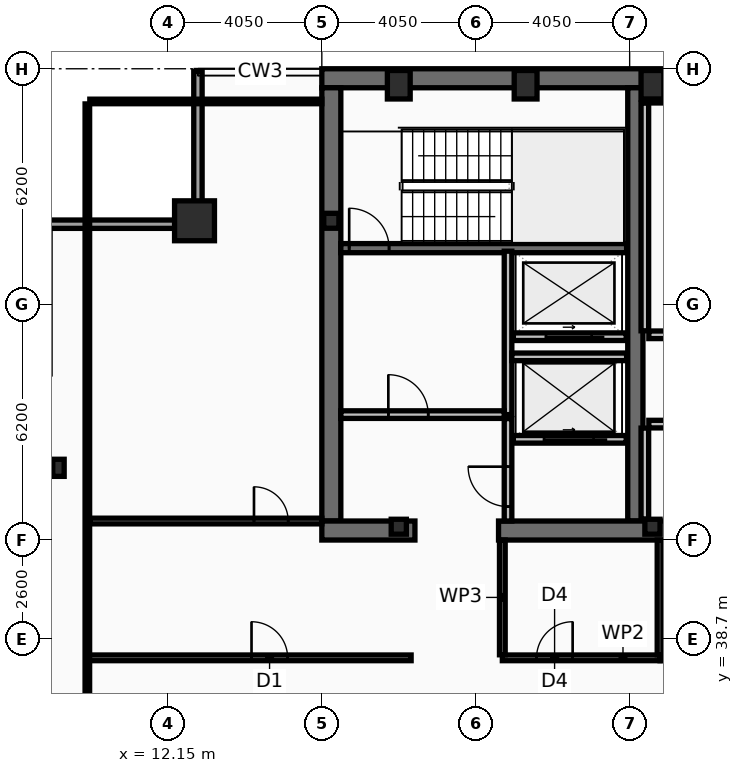
"""IFC4 building model, lengths in metres.
Left out: names, types, materials, properties, quantities, classifications, styles, units other than length and angle.
Written with IfcOpenShell. Run it as: python <this file> out.ifc"""

import sys

from ifc_helpers import new_model, si_unit, direction, frame, frame_2d, origin, origin_2d, place, context, subcontext, project, spatial, rectangle, hollow_rectangle, i_section, extrude, element, fill, save


model = new_model("IFC4")
c1 = context("Model", 3, precision=1e-05, world=origin(), true_north=direction((0.0, 1.0)))
c2 = subcontext(c1, "Body", "Model", "MODEL_VIEW")
j1 = project(units=[si_unit("LENGTHUNIT", "METRE"), si_unit("PLANEANGLEUNIT", "RADIAN")], contexts=[c1])
p1 = place(None, origin())
s1 = spatial("IfcSite", under=j1, at=p1, CompositionType="ELEMENT")
p2 = place(p1, origin())
s2 = spatial("IfcBuilding", under=s1, at=p2, CompositionType="ELEMENT")
p3 = place(p2, frame((0.0, 0.0, 269.8)))
s3 = spatial("IfcBuildingStorey", under=s2, at=p3, CompositionType="ELEMENT", Elevation=269.8)
p4 = place(p3, frame((16.2, 53.45, 0.0), z_axis=(0.0, 0.0, 1.0), x_axis=(1.0, 0.0, 0.0)))
e1 = element("IfcWall", 1, at=p4, inside=s3, PredefinedType="SHEAR", context=c2, shape_type="SweptSolid", body=[
    extrude(rectangle(XDim=40.5, YDim=0.5, at=frame_2d((20.25, 0.0))), origin(), (0.0, 0.0, 1.0), 3.44),
])
p5 = place(p3, frame((16.45, 41.8, 0.0), z_axis=(0.0, 0.0, 1.0), x_axis=(0.0, 1.0, 0.0)))
e2 = element("IfcWall", 2, at=p5, inside=s3, PredefinedType="SHEAR", context=c2, shape_type="SweptSolid", body=[
    extrude(rectangle(XDim=11.4, YDim=0.5, at=frame_2d((5.7, 0.0))), origin(), (0.0, 0.0, 1.0), 3.44),
])
p6 = place(p3, frame((24.45, 41.8, 0.0), z_axis=(0.0, 0.0, 1.0), x_axis=(0.0, 1.0, 0.0)))
e3 = element("IfcWall", 3, at=p6, inside=s3, PredefinedType="SHEAR", context=c2, shape_type="SweptSolid", body=[
    extrude(rectangle(XDim=11.4, YDim=0.4, at=frame_2d((5.7, 0.0))), origin(), (0.0, 0.0, 1.0), 3.44),
])
p7 = place(p3, frame((18.65, 41.55, 0.0), z_axis=(0.0, 0.0, 1.0), x_axis=(-1.0, 0.0, 0.0)))
e4 = element("IfcWall", 4, at=p7, inside=s3, PredefinedType="SHEAR", context=c2, shape_type="SweptSolid", body=[
    extrude(rectangle(XDim=2.45, YDim=0.5, at=frame_2d((1.225, 0.0))), origin(), (0.0, 0.0, 1.0), 3.44),
])
p8 = place(p3, frame((32.3, 41.55, 0.0), z_axis=(0.0, 0.0, 1.0), x_axis=(-1.0, 0.0, 0.0)))
e5 = element("IfcWall", 5, at=p8, inside=s3, PredefinedType="SHEAR", context=c2, shape_type="SweptSolid", body=[
    extrude(rectangle(XDim=11.45, YDim=0.5, at=frame_2d((5.725, 0.0))), origin(), (0.0, 0.0, 1.0), 3.44),
])
p9 = place(p3, frame((16.7, 48.98, 0.0), z_axis=(0.0, 0.0, 1.0), x_axis=(1.0, 0.0, 0.0)))
e6 = element("IfcWall", 6, at=p9, inside=s3, PredefinedType="SHEAR", context=c2, shape_type="SweptSolid", body=[
    extrude(rectangle(XDim=7.52, YDim=0.24, at=frame_2d((3.76, 0.0))), origin(), (0.0, 0.0, 1.0), 3.44),
])
p10 = place(p9, frame((0.22, 0.0, 0.0)))
e7 = element("IfcOpeningElement", 7, at=p10, cuts=e6, PredefinedType="OPENING", context=c2, shape_type="SweptSolid", body=[
    extrude(rectangle(XDim=1.05, YDim=2.15, at=frame_2d((0.525, 1.075))), frame((0.0, 0.13, 0.0), z_axis=(0.0, -1.0, 0.0), x_axis=(1.0, 0.0, 0.0)), (0.0, 0.0, 1.0), 0.26),
])
p11 = place(p3, frame((12.85, 49.7, 0.0), z_axis=(0.0, 0.0, 1.0), x_axis=(1.0, 0.0, 0.0)))
e8 = element("IfcColumn", 8, at=p11, inside=s3, PredefinedType="COLUMN", context=c2, shape_type="SweptSolid", body=[
    extrude(hollow_rectangle(XDim=1.05, YDim=1.05, WallThickness=0.055, at=origin_2d()), origin(), (0.0, 0.0, 1.0), 3.6),
])
for number, where, z_axis, x_axis in (
    (9, (18.225, 53.28, 0.0), (0.0, 0.0, 1.0), (1.0, 0.0, 0.0)),
    (10, (21.562, 53.28, 0.0), (0.0, 0.0, 1.0), (1.0, 0.0, 0.0)),
    (11, (24.9, 53.28, 0.0), (0.0, 0.0, 1.0), (1.0, 0.0, 0.0)),
):
    element("IfcColumn", number, at=place(p3, frame(where, z_axis=z_axis, x_axis=x_axis)), inside=s3, PredefinedType="COLUMN", context=c2, shape_type="SweptSolid", body=[
        extrude(hollow_rectangle(XDim=0.6, YDim=0.75, WallThickness=0.045, at=origin_2d()), origin(), (0.0, 0.0, 1.0), 3.6),
    ])
p12 = place(p3, frame((9.27, 43.2, 0.0), z_axis=(0.0, 0.0, 1.0), x_axis=(1.0, 0.0, 0.0)))
e12 = element("IfcColumn", 12, at=p12, inside=s3, PredefinedType="COLUMN", context=c2, shape_type="SweptSolid", body=[
    extrude(i_section(OverallWidth=0.3, OverallDepth=0.45, WebThickness=0.014, FlangeThickness=0.026, at=origin_2d()), origin(), (0.0, 0.0, 1.0), 3.6),
])
for number, where, z_axis, x_axis in (
    (13, (16.45, 49.7, 0.0), (0.0, 0.0, 1.0), (1.0, 0.0, 0.0)),
    (14, (18.225, 41.65, 0.0), (0.0, 0.0, 1.0), (1.0, 0.0, 0.0)),
    (15, (24.9, 41.65, 0.0), (0.0, 0.0, 1.0), (1.0, 0.0, 0.0)),
):
    element("IfcColumn", number, at=place(p3, frame(where, z_axis=z_axis, x_axis=x_axis)), inside=s3, PredefinedType="COLUMN", context=c2, shape_type="SweptSolid", body=[
        extrude(i_section(OverallWidth=0.399, OverallDepth=0.393, WebThickness=0.023, FlangeThickness=0.037, at=origin_2d()), origin(), (0.0, 0.0, 1.0), 3.6),
    ])
p13 = place(p3, frame((8.83, 49.61, 0.0), z_axis=(0.0, 0.0, 1.0), x_axis=(1.0, 0.0, 0.0)))
e16 = element("IfcWall", 16, at=p13, inside=s3, PredefinedType="SOLIDWALL", context=c2, shape_type="SweptSolid", body=[
    extrude(rectangle(XDim=4.22, YDim=0.22, at=frame_2d((2.11, 0.0))), origin(), (0.0, 0.0, 1.0), 2.88),
])
p14 = place(p3, frame((12.94, 49.72, 0.0), z_axis=(0.0, 0.0, 1.0), x_axis=(0.0, 1.0, 0.0)))
e17 = element("IfcWall", 17, at=p14, inside=s3, PredefinedType="SOLIDWALL", context=c2, shape_type="SweptSolid", body=[
    extrude(rectangle(XDim=3.91, YDim=0.22, at=frame_2d((1.955, 0.0))), origin(), (0.0, 0.0, 1.0), 2.88),
])
p15 = place(p3, frame((24.21, 43.95, 0.0), z_axis=(0.0, 0.0, 1.0), x_axis=(-1.0, 0.0, 0.0)))
e18 = element("IfcWall", 18, at=p15, inside=s3, PredefinedType="PARTITIONING", context=c2, shape_type="SweptSolid", body=[
    extrude(rectangle(XDim=2.97, YDim=0.2, at=frame_2d((1.485, 0.0))), origin(), (0.0, 0.0, 1.0), 3.44),
])
p16 = place(p15, frame((0.86, 0.0, 0.0)))
e19 = element("IfcOpeningElement", 19, at=p16, cuts=e18, PredefinedType="OPENING", context=c2, shape_type="SweptSolid", body=[
    extrude(rectangle(XDim=1.3, YDim=2.18, at=frame_2d((0.65, 1.09))), frame((0.0, 0.11, 0.0), z_axis=(0.0, -1.0, 0.0), x_axis=(1.0, 0.0, 0.0)), (0.0, 0.0, 1.0), 0.22),
])
p17 = place(p3, frame((24.21, 46.65, 0.0), z_axis=(0.0, 0.0, 1.0), x_axis=(-1.0, 0.0, 0.0)))
e20 = element("IfcWall", 20, at=p17, inside=s3, PredefinedType="PARTITIONING", context=c2, shape_type="SweptSolid", body=[
    extrude(rectangle(XDim=2.97, YDim=0.2, at=frame_2d((1.485, 0.0))), origin(), (0.0, 0.0, 1.0), 3.44),
])
p18 = place(p17, frame((0.91, 0.0, 0.0)))
e21 = element("IfcOpeningElement", 21, at=p18, cuts=e20, PredefinedType="OPENING", context=c2, shape_type="SweptSolid", body=[
    extrude(rectangle(XDim=1.2, YDim=2.18, at=frame_2d((0.6, 1.09))), frame((0.0, 0.11, 0.0), z_axis=(0.0, -1.0, 0.0), x_axis=(1.0, 0.0, 0.0)), (0.0, 0.0, 1.0), 0.22),
])
p19 = place(p3, frame((21.1, 44.6, 0.0), z_axis=(0.0, 0.0, 1.0), x_axis=(0.0, 1.0, 0.0)))
e22 = element("IfcWall", 22, at=p19, inside=s3, PredefinedType="PARTITIONING", context=c2, shape_type="SweptSolid", body=[
    extrude(rectangle(XDim=4.3, YDim=0.2, at=frame_2d((2.15, 0.0))), origin(), (0.0, 0.0, 1.0), 3.44),
])
p20 = place(p3, frame((16.7, 44.6, 0.0), z_axis=(0.0, 0.0, 1.0), x_axis=(1.0, 0.0, 0.0)))
e23 = element("IfcWall", 23, at=p20, inside=s3, PredefinedType="PARTITIONING", context=c2, shape_type="SweptSolid", body=[
    extrude(rectangle(XDim=4.3, YDim=0.2, at=frame_2d((2.15, 0.0))), origin(), (0.0, 0.0, 1.0), 3.44),
])
p21 = place(p20, frame((1.25, 0.0, 0.0)))
e24 = element("IfcOpeningElement", 24, at=p21, cuts=e23, PredefinedType="OPENING", context=c2, shape_type="SweptSolid", body=[
    extrude(rectangle(XDim=1.05, YDim=2.15, at=frame_2d((0.525, 1.075))), frame((0.0, 0.11, 0.0), z_axis=(0.0, -1.0, 0.0), x_axis=(1.0, 0.0, 0.0)), (0.0, 0.0, 1.0), 0.22),
])
p22 = place(p3, frame((21.2, 46.12, 0.0), z_axis=(0.0, 0.0, 1.0), x_axis=(1.0, 0.0, 0.0)))
e25 = element("IfcWall", 25, at=p22, inside=s3, PredefinedType="PARTITIONING", context=c2, shape_type="SweptSolid", body=[
    extrude(rectangle(XDim=3.02, YDim=0.2, at=frame_2d((1.51, 0.0))), origin(), (0.0, 0.0, 1.0), 3.44),
])
p23 = place(p3, frame((21.1, 41.8, 0.0), z_axis=(0.0, 0.0, 1.0), x_axis=(0.0, 1.0, 0.0)))
e26 = element("IfcWall", 26, at=p23, inside=s3, PredefinedType="PARTITIONING", context=c2, shape_type="SweptSolid", body=[
    extrude(rectangle(XDim=2.695, YDim=0.2, at=frame_2d((1.348, 0.0))), origin(), (0.0, 0.0, 1.0), 3.44),
])
p24 = place(p23, frame((0.38, 0.0, 0.0)))
e27 = element("IfcOpeningElement", 27, at=p24, cuts=e26, PredefinedType="OPENING", context=c2, shape_type="SweptSolid", body=[
    extrude(rectangle(XDim=1.05, YDim=2.15, at=frame_2d((0.525, 1.075))), frame((0.0, 0.11, 0.0), z_axis=(0.0, -1.0, 0.0), x_axis=(1.0, 0.0, 0.0)), (0.0, 0.0, 1.0), 0.22),
])
p25 = place(p3, frame((24.7, 46.805, 0.0), z_axis=(0.0, 0.0, 1.0), x_axis=(0.0, 1.0, 0.0)))
e28 = element("IfcWall", 28, at=p25, inside=s3, PredefinedType="PARTITIONING", context=c2, shape_type="SweptSolid", body=[
    extrude(rectangle(XDim=5.99, YDim=0.2, at=frame_2d((2.995, 0.0))), origin(), (0.0, 0.0, 1.0), 3.44),
])
p26 = place(p3, frame((24.805, 52.86, 0.0), z_axis=(0.0, 0.0, 1.0), x_axis=(1.0, 0.0, 0.0)))
e29 = element("IfcWall", 29, at=p26, inside=s3, PredefinedType="PARTITIONING", context=c2, shape_type="SweptSolid", body=[
    extrude(rectangle(XDim=7.51, YDim=0.12, at=frame_2d((3.755, 0.0))), origin(), (0.0, 0.0, 1.0), 3.44),
])
p27 = place(p3, frame((24.805, 46.7, 0.0), z_axis=(0.0, 0.0, 1.0), x_axis=(1.0, 0.0, 0.0)))
e30 = element("IfcWall", 30, at=p27, inside=s3, PredefinedType="PARTITIONING", context=c2, shape_type="SweptSolid", body=[
    extrude(rectangle(XDim=7.51, YDim=0.2, at=frame_2d((3.755, 0.0))), origin(), (0.0, 0.0, 1.0), 3.44),
])
p28 = place(p27, frame((2.4, 0.0, 0.0)))
e31 = element("IfcOpeningElement", 31, at=p28, cuts=e30, PredefinedType="OPENING", context=c2, shape_type="SweptSolid", body=[
    extrude(rectangle(XDim=0.95, YDim=2.1, at=frame_2d((0.475, 1.05))), frame((0.0, 0.11, 0.0), z_axis=(0.0, -1.0, 0.0), x_axis=(1.0, 0.0, 0.0)), (0.0, 0.0, 1.0), 0.22),
])
p29 = place(p3, frame((24.7, 41.85, 0.0), z_axis=(0.0, 0.0, 1.0), x_axis=(0.0, 1.0, 0.0)))
e32 = element("IfcWall", 32, at=p29, inside=s3, PredefinedType="PARTITIONING", context=c2, shape_type="SweptSolid", body=[
    extrude(rectangle(XDim=2.395, YDim=0.2, at=frame_2d((1.198, 0.0))), origin(), (0.0, 0.0, 1.0), 3.44),
])
p30 = place(p3, frame((24.805, 44.35, 0.0), z_axis=(0.0, 0.0, 1.0), x_axis=(1.0, 0.0, 0.0)))
e33 = element("IfcWall", 33, at=p30, inside=s3, PredefinedType="PARTITIONING", context=c2, shape_type="SweptSolid", body=[
    extrude(rectangle(XDim=7.34, YDim=0.2, at=frame_2d((3.67, 0.0))), origin(), (0.0, 0.0, 1.0), 3.44),
])
p31 = place(p30, frame((2.4, 0.0, 0.0)))
e34 = element("IfcOpeningElement", 34, at=p31, cuts=e33, PredefinedType="OPENING", context=c2, shape_type="SweptSolid", body=[
    extrude(rectangle(XDim=0.95, YDim=2.1, at=frame_2d((0.475, 1.05))), frame((0.0, 0.11, 0.0), z_axis=(0.0, -1.0, 0.0), x_axis=(1.0, 0.0, 0.0)), (0.0, 0.0, 1.0), 0.22),
])
p32 = place(p3, frame((20.95, 38.2, 0.0), z_axis=(0.0, 0.0, 1.0), x_axis=(1.0, 0.0, 0.0)))
e35 = element("IfcWall", 35, at=p32, inside=s3, PredefinedType="PARTITIONING", context=c2, shape_type="SweptSolid", body=[
    extrude(rectangle(XDim=4.15, YDim=0.15, at=frame_2d((2.075, 0.0))), origin(), (0.0, 0.0, 1.0), 2.78),
])
p33 = place(p32, frame((0.9, 0.0, 0.0)))
e36 = element("IfcOpeningElement", 36, at=p33, cuts=e35, PredefinedType="OPENING", context=c2, shape_type="SweptSolid", body=[
    extrude(rectangle(XDim=0.95, YDim=2.05, at=frame_2d((0.475, 1.025))), frame((0.0, 0.085, 0.0), z_axis=(0.0, -1.0, 0.0), x_axis=(1.0, 0.0, 0.0)), (0.0, 0.0, 1.0), 0.17),
])
p34 = place(p3, frame((25.1, 38.2, 0.0), z_axis=(0.0, 0.0, 1.0), x_axis=(1.0, 0.0, 0.0)))
e37 = element("IfcWall", 37, at=p34, inside=s3, PredefinedType="PARTITIONING", context=c2, shape_type="SweptSolid", body=[
    extrude(rectangle(XDim=3.3, YDim=0.15, at=frame_2d((1.65, 0.0))), origin(), (0.0, 0.0, 1.0), 2.78),
])
p35 = place(p34, frame((0.9, 0.0, 0.0)))
e38 = element("IfcOpeningElement", 38, at=p35, cuts=e37, PredefinedType="OPENING", context=c2, shape_type="SweptSolid", body=[
    extrude(rectangle(XDim=0.95, YDim=2.05, at=frame_2d((0.475, 1.025))), frame((0.0, 0.085, 0.0), z_axis=(0.0, -1.0, 0.0), x_axis=(1.0, 0.0, 0.0)), (0.0, 0.0, 1.0), 0.17),
])
p36 = place(p3, frame((20.95, 38.28, 0.0), z_axis=(0.0, 0.0, 1.0), x_axis=(0.0, 1.0, 0.0)))
e39 = element("IfcWall", 39, at=p36, inside=s3, PredefinedType="PARTITIONING", context=c2, shape_type="SweptSolid", body=[
    extrude(rectangle(XDim=3.02, YDim=0.15, at=frame_2d((1.51, 0.0))), origin(), (0.0, 0.0, 1.0), 3.44),
])
p37 = place(p3, frame((25.1, 38.28, 0.0), z_axis=(0.0, 0.0, 1.0), x_axis=(0.0, 1.0, 0.0)))
e40 = element("IfcWall", 40, at=p37, inside=s3, PredefinedType="PARTITIONING", context=c2, shape_type="SweptSolid", body=[
    extrude(rectangle(XDim=3.02, YDim=0.15, at=frame_2d((1.51, 0.0))), origin(), (0.0, 0.0, 1.0), 2.78),
])
p38 = place(p3, frame((10.03, 38.2, 0.0), z_axis=(0.0, 0.0, 1.0), x_axis=(1.0, 0.0, 0.0)))
e41 = element("IfcWall", 41, at=p38, inside=s3, PredefinedType="PARTITIONING", context=c2, shape_type="SweptSolid", body=[
    extrude(rectangle(XDim=8.52, YDim=0.15, at=frame_2d((4.26, 0.0))), origin(), (0.0, 0.0, 1.0), 2.78),
])
p39 = place(p38, frame((4.32, 0.0, 0.0)))
e42 = element("IfcOpeningElement", 42, at=p39, cuts=e41, PredefinedType="OPENING", context=c2, shape_type="SweptSolid", body=[
    extrude(rectangle(XDim=0.95, YDim=2.05, at=frame_2d((0.475, 1.025))), frame((0.0, 0.085, 0.0), z_axis=(0.0, -1.0, 0.0), x_axis=(1.0, 0.0, 0.0)), (0.0, 0.0, 1.0), 0.17),
])
p40 = place(p3, frame((10.095, 41.8, 0.0), z_axis=(0.0, 0.0, 1.0), x_axis=(1.0, 0.0, 0.0)))
e43 = element("IfcWall", 43, at=p40, inside=s3, PredefinedType="PARTITIONING", context=c2, shape_type="SweptSolid", body=[
    extrude(rectangle(XDim=6.105, YDim=0.15, at=frame_2d((3.052, 0.0))), origin(), (0.0, 0.0, 1.0), 3.44),
])
p41 = place(p40, frame((4.32, 0.0, 0.0)))
e44 = element("IfcOpeningElement", 44, at=p41, cuts=e43, PredefinedType="OPENING", context=c2, shape_type="SweptSolid", body=[
    extrude(rectangle(XDim=0.9, YDim=2.05, at=frame_2d((0.45, 1.025))), frame((0.0, 0.085, 0.0), z_axis=(0.0, -1.0, 0.0), x_axis=(1.0, 0.0, 0.0)), (0.0, 0.0, 1.0), 0.17),
])
p42 = place(p3, frame((10.03, 10.665, 0.0), z_axis=(0.0, 0.0, 1.0), x_axis=(0.0, 1.0, 0.0)))
e45 = element("IfcWall", 45, at=p42, inside=s3, PredefinedType="PARTITIONING", context=c2, shape_type="SweptSolid", body=[
    extrude(rectangle(XDim=42.11, YDim=0.12, at=frame_2d((21.055, 0.0))), origin(), (0.0, 0.0, 1.0), 2.78),
])
p43 = place(p3, frame((10.095, 52.84, 0.0), z_axis=(0.0, 0.0, 1.0), x_axis=(1.0, 0.0, 0.0)))
e46 = element("IfcWall", 46, at=p43, inside=s3, PredefinedType="PARTITIONING", context=c2, shape_type="SweptSolid", body=[
    extrude(rectangle(XDim=6.105, YDim=0.12, at=frame_2d((3.052, 0.0))), origin(), (0.0, 0.0, 1.0), 3.44),
])
p44 = place(p10, origin())
e47 = element("IfcDoor", 47, at=p44, inside=s3, OperationType="SINGLE_SWING_LEFT", PredefinedType="DOOR", context=c2, shape_type="SweptSolid", body=[
    extrude(rectangle(XDim=1.05, YDim=2.15, at=frame_2d((0.525, 1.075))), frame((0.0, 0.025, 0.0), z_axis=(0.0, -1.0, 0.0), x_axis=(1.0, 0.0, 0.0)), (0.0, 0.0, 1.0), 0.05),
])
fill(e7, e47)
p45 = place(p16, origin())
e48 = element("IfcDoor", 48, at=p45, inside=s3, OperationType="SLIDING_TO_LEFT", PredefinedType="DOOR", context=c2, shape_type="SweptSolid", body=[
    extrude(rectangle(XDim=1.3, YDim=2.18, at=frame_2d((0.65, 1.09))), frame((0.0, 0.025, 0.0), z_axis=(0.0, -1.0, 0.0), x_axis=(1.0, 0.0, 0.0)), (0.0, 0.0, 1.0), 0.05),
])
fill(e19, e48)
p46 = place(p18, origin())
e49 = element("IfcDoor", 49, at=p46, inside=s3, OperationType="SLIDING_TO_LEFT", PredefinedType="DOOR", context=c2, shape_type="SweptSolid", body=[
    extrude(rectangle(XDim=1.2, YDim=2.18, at=frame_2d((0.6, 1.09))), frame((0.0, 0.025, 0.0), z_axis=(0.0, -1.0, 0.0), x_axis=(1.0, 0.0, 0.0)), (0.0, 0.0, 1.0), 0.05),
])
fill(e21, e49)
p47 = place(p21, origin())
e50 = element("IfcDoor", 50, at=p47, inside=s3, OperationType="SINGLE_SWING_LEFT", PredefinedType="DOOR", context=c2, shape_type="SweptSolid", body=[
    extrude(rectangle(XDim=1.05, YDim=2.15, at=frame_2d((0.525, 1.075))), frame((0.0, 0.025, 0.0), z_axis=(0.0, -1.0, 0.0), x_axis=(1.0, 0.0, 0.0)), (0.0, 0.0, 1.0), 0.05),
])
fill(e24, e50)
p48 = place(p24, origin())
e51 = element("IfcDoor", 51, at=p48, inside=s3, OperationType="SINGLE_SWING_RIGHT", PredefinedType="DOOR", context=c2, shape_type="SweptSolid", body=[
    extrude(rectangle(XDim=1.05, YDim=2.15, at=frame_2d((0.525, 1.075))), frame((0.0, 0.025, 0.0), z_axis=(0.0, -1.0, 0.0), x_axis=(1.0, 0.0, 0.0)), (0.0, 0.0, 1.0), 0.05),
])
fill(e27, e51)
p49 = place(p33, origin())
e52 = element("IfcDoor", 52, at=p49, inside=s3, OperationType="SINGLE_SWING_RIGHT", PredefinedType="DOOR", context=c2, shape_type="SweptSolid", body=[
    extrude(rectangle(XDim=0.95, YDim=2.05, at=frame_2d((0.475, 1.025))), frame((0.0, 0.025, 0.0), z_axis=(0.0, -1.0, 0.0), x_axis=(1.0, 0.0, 0.0)), (0.0, 0.0, 1.0), 0.05),
])
fill(e36, e52)
p50 = place(p39, origin())
e53 = element("IfcDoor", 53, at=p50, inside=s3, OperationType="SINGLE_SWING_LEFT", PredefinedType="DOOR", context=c2, shape_type="SweptSolid", body=[
    extrude(rectangle(XDim=0.95, YDim=2.05, at=frame_2d((0.475, 1.025))), frame((0.0, 0.025, 0.0), z_axis=(0.0, -1.0, 0.0), x_axis=(1.0, 0.0, 0.0)), (0.0, 0.0, 1.0), 0.05),
])
fill(e42, e53)
p51 = place(p41, origin())
e54 = element("IfcDoor", 54, at=p51, inside=s3, OperationType="SINGLE_SWING_LEFT", PredefinedType="DOOR", context=c2, shape_type="SweptSolid", body=[
    extrude(rectangle(XDim=0.9, YDim=2.05, at=frame_2d((0.45, 1.025))), frame((0.0, 0.025, 0.0), z_axis=(0.0, -1.0, 0.0), x_axis=(1.0, 0.0, 0.0)), (0.0, 0.0, 1.0), 0.05),
])
fill(e44, e54)
save(model, sys.argv[1])
